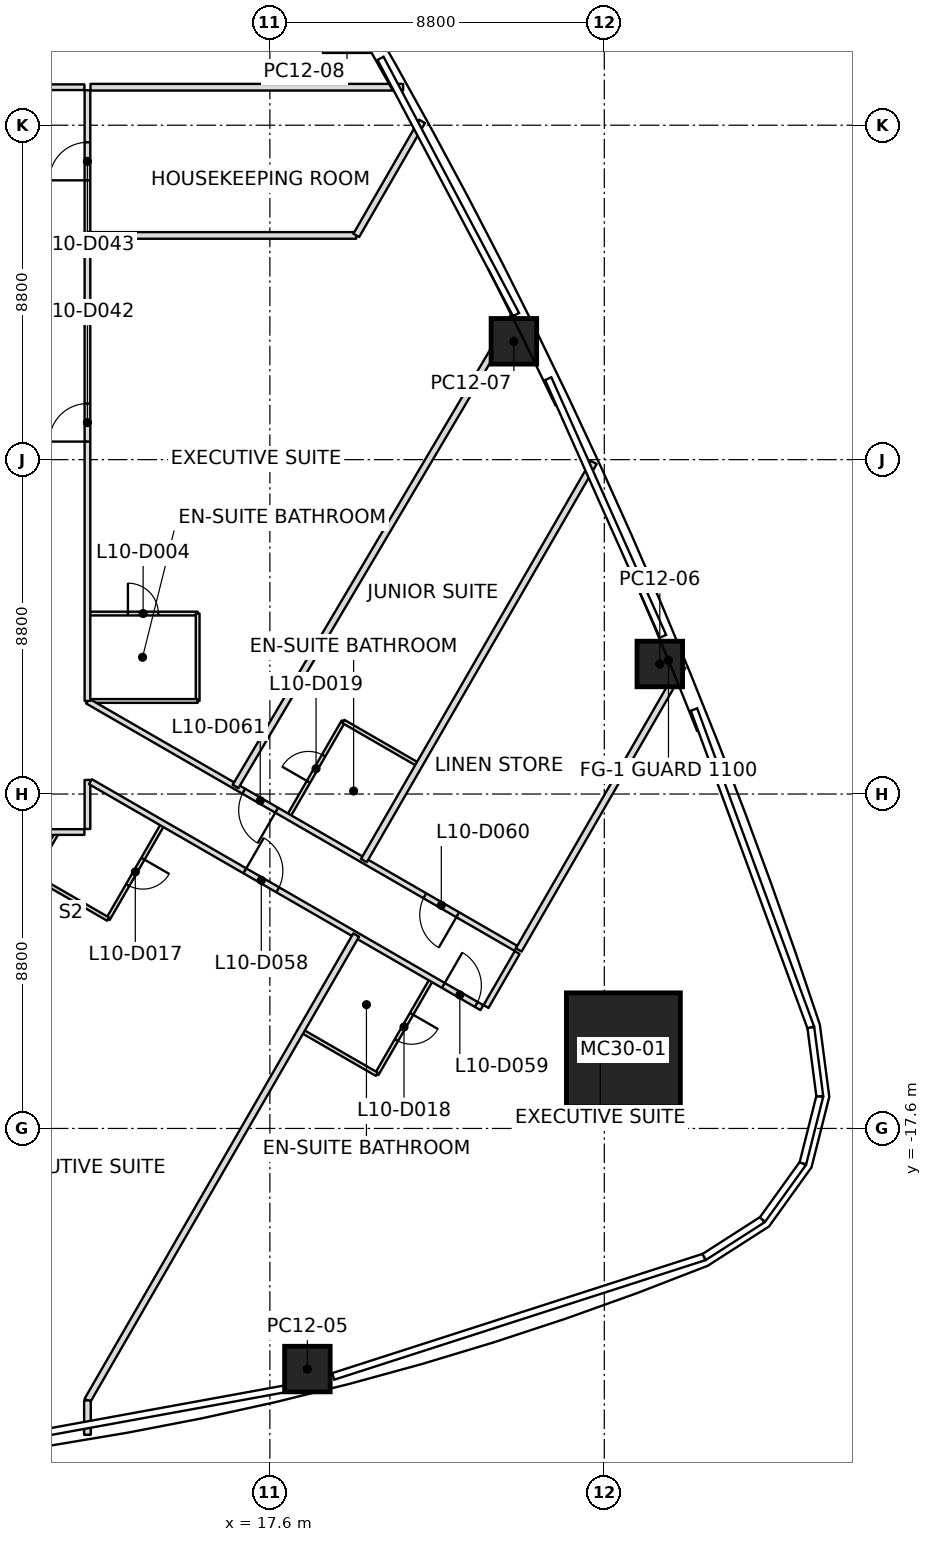
"""IFC4 building model, lengths in metres.
Left out: names, types, materials, properties, quantities, classifications, styles, units other than length and angle.
Written with IfcOpenShell. Run it as: python <this file> out.ifc"""

import sys

from ifc_helpers import new_model, si_unit, direction, frame, frame_2d, origin, origin_2d, place, context, subcontext, project, spatial, rectangle, extrude, clip, halfspace, element, fill, save


model = new_model("IFC4")
c1 = context("Model", 3, precision=1e-05, world=origin(), true_north=direction((0.0, 1.0)))
c2 = subcontext(c1, "Body", "Model", "MODEL_VIEW")
j1 = project(units=[si_unit("LENGTHUNIT", "METRE"), si_unit("PLANEANGLEUNIT", "RADIAN")], contexts=[c1])
p1 = place(None, origin())
s1 = spatial("IfcSite", under=j1, at=p1, CompositionType="ELEMENT")
p2 = place(p1, origin())
s2 = spatial("IfcBuilding", under=s1, at=p2, CompositionType="ELEMENT")
p3 = place(p2, frame((0.0, 0.0, 59.1)))
s3 = spatial("IfcBuildingStorey", under=s2, at=p3, CompositionType="ELEMENT", Elevation=59.1)
p4 = place(p3, frame((26.902, -15.532, 0.0), z_axis=(-0.030597838594, 0.017672889533, 0.99937552564), x_axis=(0.99953177652, 0.000541005533, 0.030593055416)))
e1 = element("IfcColumn", 1, at=p4, inside=s3, PredefinedType="COLUMN", context=c2, shape_type="SweptSolid", body=[
    extrude(rectangle(XDim=3.0, YDim=3.0, at=origin_2d()), origin(), (0.0, 0.0, 1.0), 3.702),
])
p5 = place(p3, frame((18.587, -23.932, 0.0), z_axis=(-0.018967622747, 0.174735976675, 0.984432612088), x_axis=(0.970613488438, 0.239463695606, -0.023803246622)))
e2 = element("IfcColumn", 2, at=p5, inside=s3, PredefinedType="COLUMN", context=c2, shape_type="SweptSolid", body=[
    clip(clip(extrude(rectangle(XDim=1.2, YDim=1.2, at=origin_2d()), origin(), (0.0, 0.0, 1.0), 3.759), halfspace(frame((0.0, 0.0, 0.001)), True)), halfspace(frame((0.0, 0.0, 3.758)), False)),
])
p6 = place(p3, frame((27.861, -5.378, 0.0), z_axis=(-0.019526598325, 0.011016695677, 0.999748640596), x_axis=(-0.381644572431, 0.92414086278, -0.017637632301)))
e3 = element("IfcColumn", 3, at=p6, inside=s3, PredefinedType="COLUMN", context=c2, shape_type="SweptSolid", body=[
    extrude(rectangle(XDim=1.2, YDim=1.2, at=origin_2d()), origin(), (0.0, 0.0, 1.0), 3.701),
])
p7 = place(p3, frame((24.021, 3.114, 0.0), z_axis=(-0.015240683228, 0.002309194428, 0.99988118754), x_axis=(-0.441769278209, 0.897085485762, -0.008805456633)))
e4 = element("IfcColumn", 4, at=p7, inside=s3, PredefinedType="COLUMN", context=c2, shape_type="SweptSolid", body=[
    extrude(rectangle(XDim=1.2, YDim=1.2, at=origin_2d()), origin(), (0.0, 0.0, 1.0), 3.7),
])
p8 = place(p3, frame((19.63, 11.333, 0.0), z_axis=(-0.010688729499, -0.00613612249, 0.999924046647), x_axis=(-0.49997143695, 0.866041893524, -2.9922579e-05)))
e5 = element("IfcColumn", 5, at=p8, inside=s3, PredefinedType="COLUMN", context=c2, shape_type="SweptSolid", body=[
    extrude(rectangle(XDim=1.2, YDim=1.2, at=origin_2d()), origin(), (0.0, 0.0, 1.0), 3.7),
])
p9 = place(p3, frame((19.87, -12.511, 0.0), z_axis=(0.0, 0.0, 1.0), x_axis=(-0.500001430823, -0.866024577697, 0.0)))
e6 = element("IfcWall", 6, at=p9, inside=s3, PredefinedType="PARTITIONING", context=c2, shape_type="SweptSolid", body=[
    extrude(rectangle(XDim=14.141, YDim=0.175, at=frame_2d((7.07, 0.0))), origin(), (0.0, 0.0, 1.0), 2.797),
])
p10 = place(p3, frame((12.8, -24.758, 0.0), z_axis=(0.0, 0.0, 1.0), x_axis=(0.0, -1.0, 0.0)))
e7 = element("IfcWall", 7, at=p10, inside=s3, PredefinedType="PARTITIONING", context=c2, shape_type="SweptSolid", body=[
    extrude(rectangle(XDim=0.904, YDim=0.175, at=frame_2d((0.452, 0.0))), origin(), (0.0, 0.0, 1.0), 3.15),
])
p11 = place(p3, frame((12.8, 5.9, 0.0), z_axis=(0.0, 0.0, 1.0), x_axis=(1.0, 0.0, 0.0)))
e8 = element("IfcWall", 8, at=p11, inside=s3, PredefinedType="PARTITIONING", context=c2, shape_type="SweptSolid", body=[
    extrude(rectangle(XDim=7.073, YDim=0.175, at=frame_2d((3.537, 0.0))), origin(), (0.0, 0.0, 1.0), 3.093),
])
p12 = place(p3, frame((19.873, 5.9, 0.0), z_axis=(0.0, 0.0, 1.0), x_axis=(0.499988788333, 0.866031876747, 0.0)))
e9 = element("IfcWall", 9, at=p12, inside=s3, PredefinedType="PARTITIONING", context=c2, shape_type="SweptSolid", body=[
    extrude(rectangle(XDim=3.465, YDim=0.175, at=frame_2d((1.732, 0.0))), origin(), (0.0, 0.0, 1.0), 2.934),
])
p13 = place(p3, frame((12.88, 9.8, 0.0), z_axis=(0.0, 0.0, 1.0), x_axis=(1.0, 0.0, 0.0)))
e10 = element("IfcWall", 10, at=p13, inside=s3, PredefinedType="PARTITIONING", context=c2, shape_type="SweptSolid", body=[
    extrude(rectangle(XDim=8.227, YDim=0.175, at=frame_2d((4.114, 0.0))), origin(), (0.0, 0.0, 1.0), 2.934),
])
p14 = place(p3, frame((24.011, 3.761, 0.0), z_axis=(0.0, 0.0, 1.0), x_axis=(-0.509232005263, -0.860629284196, 0.0)))
e11 = element("IfcWall", 11, at=p14, inside=s3, PredefinedType="PARTITIONING", context=c2, shape_type="SweptSolid", body=[
    extrude(rectangle(XDim=14.364, YDim=0.175, at=frame_2d((7.182, 0.0))), origin(), (0.0, 0.0, 1.0), 2.947),
])
p15 = place(p3, frame((26.124, -0.073, 0.0), z_axis=(0.0, 0.0, 1.0), x_axis=(-0.49999146167, -0.866030333335, 0.0)))
e12 = element("IfcWall", 12, at=p15, inside=s3, PredefinedType="PARTITIONING", context=c2, shape_type="SweptSolid", body=[
    extrude(rectangle(XDim=12.098, YDim=0.175, at=frame_2d((6.049, 0.0))), origin(), (0.0, 0.0, 1.0), 2.934),
])
p16 = place(p3, frame((24.148, -12.903, 0.0), z_axis=(0.0, 0.0, 1.0), x_axis=(0.500014238528, 0.866017183011, 0.0)))
e13 = element("IfcWall", 13, at=p16, inside=s3, PredefinedType="PARTITIONING", context=c2, shape_type="SweptSolid", body=[
    extrude(rectangle(XDim=8.619, YDim=0.175, at=frame_2d((4.31, 0.0))), origin(), (0.0, 0.0, 1.0), 2.934),
])
p17 = place(p3, frame((-12.72, -9.8, 0.0), z_axis=(0.0, 0.0, 1.0), x_axis=(1.0, 0.0, 0.0)))
e14 = element("IfcWall", 14, at=p17, inside=s3, PredefinedType="PARTITIONING", context=c2, shape_type="SweptSolid", body=[
    extrude(rectangle(XDim=25.44, YDim=0.15, at=frame_2d((12.72, 0.0))), origin(), (0.0, 0.0, 1.0), 2.947),
])
p18 = place(p17, frame((3.07, 0.0, 0.0)))
e15 = element("IfcOpeningElement", 15, at=p18, cuts=e14, PredefinedType="OPENING", context=c2, shape_type="SweptSolid", body=[
    extrude(rectangle(XDim=1.0, YDim=2.1, at=frame_2d((0.5, 1.05))), frame((0.0, 0.075, 0.0), z_axis=(0.0, -1.0, 0.0), x_axis=(1.0, 0.0, 0.0)), (0.0, 0.0, 1.0), 0.15),
])
p19 = place(p17, frame((7.47, 0.0, 0.0)))
e16 = element("IfcOpeningElement", 16, at=p19, cuts=e14, PredefinedType="OPENING", context=c2, shape_type="SweptSolid", body=[
    extrude(rectangle(XDim=1.0, YDim=2.1, at=frame_2d((0.5, 1.05))), frame((0.0, 0.075, 0.0), z_axis=(0.0, -1.0, 0.0), x_axis=(1.0, 0.0, 0.0)), (0.0, 0.0, 1.0), 0.15),
])
p20 = place(p17, frame((11.67, 0.0, 0.0)))
e17 = element("IfcOpeningElement", 17, at=p20, cuts=e14, PredefinedType="OPENING", context=c2, shape_type="SweptSolid", body=[
    extrude(rectangle(XDim=1.0, YDim=2.1, at=frame_2d((0.5, 1.05))), frame((0.0, 0.075, 0.0), z_axis=(0.0, -1.0, 0.0), x_axis=(1.0, 0.0, 0.0)), (0.0, 0.0, 1.0), 0.15),
])
p21 = place(p17, frame((15.87, 0.0, 0.0)))
e18 = element("IfcOpeningElement", 18, at=p21, cuts=e14, PredefinedType="OPENING", context=c2, shape_type="SweptSolid", body=[
    extrude(rectangle(XDim=1.0, YDim=2.1, at=frame_2d((0.5, 1.05))), frame((0.0, 0.075, 0.0), z_axis=(0.0, -1.0, 0.0), x_axis=(1.0, 0.0, 0.0)), (0.0, 0.0, 1.0), 0.15),
])
p22 = place(p17, frame((20.07, 0.0, 0.0)))
e19 = element("IfcOpeningElement", 19, at=p22, cuts=e14, PredefinedType="OPENING", context=c2, shape_type="SweptSolid", body=[
    extrude(rectangle(XDim=1.0, YDim=2.1, at=frame_2d((0.5, 1.05))), frame((0.0, 0.075, 0.0), z_axis=(0.0, -1.0, 0.0), x_axis=(1.0, 0.0, 0.0)), (0.0, 0.0, 1.0), 0.15),
])
p23 = place(p3, frame((12.72, 9.8, 0.0), z_axis=(0.0, 0.0, 1.0), x_axis=(-1.0, 0.0, 0.0)))
e20 = element("IfcWall", 20, at=p23, inside=s3, PredefinedType="PARTITIONING", context=c2, shape_type="SweptSolid", body=[
    extrude(rectangle(XDim=3.42, YDim=0.15, at=frame_2d((1.71, 0.0))), origin(), (0.0, 0.0, 1.0), 3.093),
])
p24 = place(p23, frame((1.16, 0.0, 0.0)))
e21 = element("IfcOpeningElement", 21, at=p24, cuts=e20, PredefinedType="OPENING", context=c2, shape_type="SweptSolid", body=[
    extrude(rectangle(XDim=1.0, YDim=2.1, at=frame_2d((0.5, 1.05))), frame((0.0, 0.075, 0.0), z_axis=(0.0, -1.0, 0.0), x_axis=(1.0, 0.0, 0.0)), (0.0, 0.0, 1.0), 0.15),
])
p25 = place(p3, frame((12.8, -9.72, 0.0), z_axis=(0.0, 0.0, 1.0), x_axis=(0.0, 1.0, 0.0)))
e22 = element("IfcWall", 22, at=p25, inside=s3, PredefinedType="PARTITIONING", context=c2, shape_type="SweptSolid", body=[
    extrude(rectangle(XDim=1.291, YDim=0.15, at=frame_2d((0.646, 0.0))), origin(), (0.0, 0.0, 1.0), 2.797),
])
p26 = place(p3, frame((12.879, -8.475, 0.0), z_axis=(0.0, 0.0, 1.0), x_axis=(0.866021146684, -0.500007373442, 0.0)))
e23 = element("IfcWall", 23, at=p26, inside=s3, PredefinedType="PARTITIONING", context=c2, shape_type="SweptSolid", body=[
    extrude(rectangle(XDim=11.892, YDim=0.15, at=frame_2d((5.946, 0.0))), origin(), (0.0, 0.0, 1.0), 2.797),
])
p27 = place(p26, frame((4.69, 0.0, 0.0)))
e24 = element("IfcOpeningElement", 24, at=p27, cuts=e23, PredefinedType="OPENING", context=c2, shape_type="SweptSolid", body=[
    extrude(rectangle(XDim=1.0, YDim=2.1, at=frame_2d((0.5, 1.05))), frame((0.0, 0.075, 0.0), z_axis=(0.0, -1.0, 0.0), x_axis=(1.0, 0.0, 0.0)), (0.0, 0.0, 1.0), 0.15),
])
p28 = place(p26, frame((10.723, 0.0, 0.0)))
e25 = element("IfcOpeningElement", 25, at=p28, cuts=e23, PredefinedType="OPENING", context=c2, shape_type="SweptSolid", body=[
    extrude(rectangle(XDim=1.0, YDim=2.1, at=frame_2d((0.5, 1.05))), frame((0.0, 0.075, 0.0), z_axis=(0.0, -1.0, 0.0), x_axis=(1.0, 0.0, 0.0)), (0.0, 0.0, 1.0), 0.15),
])
p29 = place(p3, frame((24.079, -12.863, 0.0), z_axis=(0.0, 0.0, 1.0), x_axis=(-0.866024189303, 0.500002103537, 0.0)))
e26 = element("IfcWall", 26, at=p29, inside=s3, PredefinedType="PARTITIONING", context=c2, shape_type="SweptSolid", body=[
    extrude(rectangle(XDim=13.023, YDim=0.15, at=frame_2d((6.512, 0.0))), origin(), (0.0, 0.0, 1.0), 2.947),
])
p30 = place(p29, frame((1.771, 0.0, 0.0)))
e27 = element("IfcOpeningElement", 27, at=p30, cuts=e26, PredefinedType="OPENING", context=c2, shape_type="SweptSolid", body=[
    extrude(rectangle(XDim=1.0, YDim=2.1, at=frame_2d((0.5, 1.05))), frame((0.0, 0.075, 0.0), z_axis=(0.0, -1.0, 0.0), x_axis=(1.0, 0.0, 0.0)), (0.0, 0.0, 1.0), 0.15),
])
p31 = place(p29, frame((7.273, 0.0, 0.0)))
e28 = element("IfcOpeningElement", 28, at=p31, cuts=e26, PredefinedType="OPENING", context=c2, shape_type="SweptSolid", body=[
    extrude(rectangle(XDim=1.0, YDim=2.1, at=frame_2d((0.5, 1.05))), frame((0.0, 0.075, 0.0), z_axis=(0.0, -1.0, 0.0), x_axis=(1.0, 0.0, 0.0)), (0.0, 0.0, 1.0), 0.15),
])
p32 = place(p3, frame((12.8, -6.351, 0.0), z_axis=(0.0, 0.0, 1.0), x_axis=(0.0, 1.0, 0.0)))
e29 = element("IfcWall", 29, at=p32, inside=s3, PredefinedType="PARTITIONING", context=c2, shape_type="SweptSolid", body=[
    extrude(rectangle(XDim=16.071, YDim=0.15, at=frame_2d((8.035, 0.0))), origin(), (0.0, 0.0, 1.0), 3.017),
])
p33 = place(p32, frame((6.825, 0.0, 0.0)))
e30 = element("IfcOpeningElement", 30, at=p33, cuts=e29, PredefinedType="OPENING", context=c2, shape_type="SweptSolid", body=[
    extrude(rectangle(XDim=1.0, YDim=2.1, at=frame_2d((0.5, 1.05))), frame((0.0, 0.075, 0.0), z_axis=(0.0, -1.0, 0.0), x_axis=(1.0, 0.0, 0.0)), (0.0, 0.0, 1.0), 0.15),
])
p34 = place(p32, frame((13.701, 0.0, 0.0)))
e31 = element("IfcOpeningElement", 31, at=p34, cuts=e29, PredefinedType="OPENING", context=c2, shape_type="SweptSolid", body=[
    extrude(rectangle(XDim=1.0, YDim=2.1, at=frame_2d((0.5, 1.05))), frame((0.0, 0.075, 0.0), z_axis=(0.0, -1.0, 0.0), x_axis=(1.0, 0.0, 0.0)), (0.0, 0.0, 1.0), 0.15),
])
p35 = place(p3, frame((23.288, -14.392, 0.0), z_axis=(0.0, 0.0, 1.0), x_axis=(0.499997335587, 0.866026942079, 0.0)))
e32 = element("IfcWall", 32, at=p35, inside=s3, PredefinedType="PARTITIONING", context=c2, shape_type="SweptSolid", body=[
    extrude(rectangle(XDim=1.64, YDim=0.15, at=frame_2d((0.82, 0.0))), origin(), (0.0, 0.0, 1.0), 2.797),
])
p36 = place(p3, frame((14.777, -9.605, 0.0), z_axis=(0.0, 0.0, 1.0), x_axis=(-0.499999802827, -0.866025517622, 0.0)))
e33 = element("IfcWall", 33, at=p36, inside=s3, PredefinedType="PARTITIONING", context=c2, shape_type="SweptSolid", body=[
    extrude(rectangle(XDim=2.87, YDim=0.1, at=frame_2d((1.435, 0.0))), origin(), (0.0, 0.0, 1.0), 2.797),
])
p37 = place(p36, frame((1.035, 0.0, 0.0)))
e34 = element("IfcOpeningElement", 34, at=p37, cuts=e33, PredefinedType="OPENING", context=c2, shape_type="SweptSolid", body=[
    extrude(rectangle(XDim=0.8, YDim=2.1, at=frame_2d((0.4, 1.05))), frame((0.0, 0.05, 0.0), z_axis=(0.0, -1.0, 0.0), x_axis=(1.0, 0.0, 0.0)), (0.0, 0.0, 1.0), 0.1),
])
p38 = place(p3, frame((13.342, -12.091, 0.0), z_axis=(0.0, 0.0, 1.0), x_axis=(-0.86602648383, 0.499998129301, 0.0)))
e35 = element("IfcWall", 35, at=p38, inside=s3, PredefinedType="PARTITIONING", context=c2, shape_type="SweptSolid", body=[
    extrude(rectangle(XDim=2.3, YDim=0.1, at=frame_2d((1.15, 0.0))), origin(), (0.0, 0.0, 1.0), 2.947),
])
p39 = place(p3, frame((11.35, -10.941, 0.0), z_axis=(0.0, 0.0, 1.0), x_axis=(0.499865263774, 0.866103179807, 0.0)))
e36 = element("IfcWall", 36, at=p39, inside=s3, PredefinedType="PARTITIONING", context=c2, shape_type="SweptSolid", body=[
    extrude(rectangle(XDim=1.282, YDim=0.1, at=frame_2d((0.641, 0.0))), origin(), (0.0, 0.0, 1.0), 3.15),
])
p40 = place(p3, frame((12.83, -4.051, 0.0), z_axis=(0.0, 0.0, 1.0), x_axis=(1.0, 0.0, 0.0)))
e37 = element("IfcWall", 37, at=p40, inside=s3, PredefinedType="PARTITIONING", context=c2, shape_type="SweptSolid", body=[
    extrude(rectangle(XDim=2.87, YDim=0.1, at=frame_2d((1.435, 0.0))), origin(), (0.0, 0.0, 1.0), 3.15),
])
p41 = place(p40, frame((1.035, 0.0, 0.0)))
e38 = element("IfcOpeningElement", 38, at=p41, cuts=e37, PredefinedType="OPENING", context=c2, shape_type="SweptSolid", body=[
    extrude(rectangle(XDim=0.8, YDim=2.1, at=frame_2d((0.4, 1.05))), frame((0.0, 0.05, 0.0), z_axis=(0.0, -1.0, 0.0), x_axis=(1.0, 0.0, 0.0)), (0.0, 0.0, 1.0), 0.1),
])
p42 = place(p3, frame((15.7, -4.051, 0.0), z_axis=(0.0, 0.0, 1.0), x_axis=(0.0, -1.0, 0.0)))
e39 = element("IfcWall", 39, at=p42, inside=s3, PredefinedType="PARTITIONING", context=c2, shape_type="SweptSolid", body=[
    extrude(rectangle(XDim=2.3, YDim=0.1, at=frame_2d((1.15, 0.0))), origin(), (0.0, 0.0, 1.0), 2.947),
])
p43 = place(p3, frame((15.7, -6.351, 0.0), z_axis=(0.0, 0.0, 1.0), x_axis=(-1.0, 0.0, 0.0)))
e40 = element("IfcWall", 40, at=p43, inside=s3, PredefinedType="PARTITIONING", context=c2, shape_type="SweptSolid", body=[
    extrude(rectangle(XDim=2.84, YDim=0.1, at=frame_2d((1.42, 0.0))), origin(), (0.0, 0.0, 1.0), 2.947),
])
p44 = place(p3, frame((18.098, -9.375, 0.0), z_axis=(0.0, 0.0, 1.0), x_axis=(0.499936001555, 0.866062350151, 0.0)))
e41 = element("IfcWall", 41, at=p44, inside=s3, PredefinedType="PARTITIONING", context=c2, shape_type="SweptSolid", body=[
    extrude(rectangle(XDim=2.87, YDim=0.1, at=frame_2d((1.435, 0.0))), origin(), (0.0, 0.0, 1.0), 2.947),
])
p45 = place(p44, frame((1.035, 0.0, 0.0)))
e42 = element("IfcOpeningElement", 42, at=p45, cuts=e41, PredefinedType="OPENING", context=c2, shape_type="SweptSolid", body=[
    extrude(rectangle(XDim=0.8, YDim=2.1, at=frame_2d((0.4, 1.05))), frame((0.0, 0.05, 0.0), z_axis=(0.0, -1.0, 0.0), x_axis=(1.0, 0.0, 0.0)), (0.0, 0.0, 1.0), 0.1),
])
p46 = place(p3, frame((19.533, -6.889, 0.0), z_axis=(0.0, 0.0, 1.0), x_axis=(0.866017224141, -0.500014167291, 0.0)))
e43 = element("IfcWall", 43, at=p46, inside=s3, PredefinedType="PARTITIONING", context=c2, shape_type="SweptSolid", body=[
    extrude(rectangle(XDim=2.27, YDim=0.1, at=frame_2d((1.135, 0.0))), origin(), (0.0, 0.0, 1.0), 2.947),
])
p47 = place(p3, frame((21.847, -13.687, 0.0), z_axis=(0.0, 0.0, 1.0), x_axis=(-0.499999802827, -0.866025517622, 0.0)))
e44 = element("IfcWall", 44, at=p47, inside=s3, PredefinedType="PARTITIONING", context=c2, shape_type="SweptSolid", body=[
    extrude(rectangle(XDim=2.87, YDim=0.1, at=frame_2d((1.435, 0.0))), origin(), (0.0, 0.0, 1.0), 3.15),
])
p48 = place(p47, frame((1.035, 0.0, 0.0)))
e45 = element("IfcOpeningElement", 45, at=p48, cuts=e44, PredefinedType="OPENING", context=c2, shape_type="SweptSolid", body=[
    extrude(rectangle(XDim=0.8, YDim=2.1, at=frame_2d((0.4, 1.05))), frame((0.0, 0.05, 0.0), z_axis=(0.0, -1.0, 0.0), x_axis=(1.0, 0.0, 0.0)), (0.0, 0.0, 1.0), 0.1),
])
p49 = place(p3, frame((20.412, -16.173, 0.0), z_axis=(0.0, 0.0, 1.0), x_axis=(-0.866017224141, 0.500014167291, 0.0)))
e46 = element("IfcWall", 46, at=p49, inside=s3, PredefinedType="PARTITIONING", context=c2, shape_type="SweptSolid", body=[
    extrude(rectangle(XDim=2.27, YDim=0.1, at=frame_2d((1.135, 0.0))), origin(), (0.0, 0.0, 1.0), 3.15),
])
p50 = place(p33, origin())
e47 = element("IfcDoor", 47, at=p50, inside=s3, OperationType="SINGLE_SWING_RIGHT", PredefinedType="DOOR", context=c2, shape_type="SweptSolid", body=[
    extrude(rectangle(XDim=1.0, YDim=2.1, at=frame_2d((0.5, 1.05))), frame((0.0, 0.025, 0.0), z_axis=(0.0, -1.0, 0.0), x_axis=(1.0, 0.0, 0.0)), (0.0, 0.0, 1.0), 0.05),
])
fill(e30, e47)
p51 = place(p41, origin())
e48 = element("IfcDoor", 48, at=p51, inside=s3, OperationType="SINGLE_SWING_LEFT", PredefinedType="DOOR", context=c2, shape_type="SweptSolid", body=[
    extrude(rectangle(XDim=0.8, YDim=2.1, at=frame_2d((0.4, 1.05))), frame((0.0, 0.025, 0.0), z_axis=(0.0, -1.0, 0.0), x_axis=(1.0, 0.0, 0.0)), (0.0, 0.0, 1.0), 0.05),
])
fill(e38, e48)
p52 = place(p34, origin())
e49 = element("IfcDoor", 49, at=p52, inside=s3, OperationType="SINGLE_SWING_LEFT", PredefinedType="DOOR", context=c2, shape_type="SweptSolid", body=[
    extrude(rectangle(XDim=1.0, YDim=2.1, at=frame_2d((0.5, 1.05))), frame((0.0, 0.025, 0.0), z_axis=(0.0, -1.0, 0.0), x_axis=(1.0, 0.0, 0.0)), (0.0, 0.0, 1.0), 0.05),
])
fill(e31, e49)
p53 = place(p27, origin())
e50 = element("IfcDoor", 50, at=p53, inside=s3, OperationType="SINGLE_SWING_LEFT", PredefinedType="DOOR", context=c2, shape_type="SweptSolid", body=[
    extrude(rectangle(XDim=1.0, YDim=2.1, at=frame_2d((0.5, 1.05))), frame((0.0, 0.025, 0.0), z_axis=(0.0, -1.0, 0.0), x_axis=(1.0, 0.0, 0.0)), (0.0, 0.0, 1.0), 0.05),
])
fill(e24, e50)
p54 = place(p37, origin())
e51 = element("IfcDoor", 51, at=p54, inside=s3, OperationType="SINGLE_SWING_LEFT", PredefinedType="DOOR", context=c2, shape_type="SweptSolid", body=[
    extrude(rectangle(XDim=0.8, YDim=2.1, at=frame_2d((0.4, 1.05))), frame((0.0, 0.025, 0.0), z_axis=(0.0, -1.0, 0.0), x_axis=(1.0, 0.0, 0.0)), (0.0, 0.0, 1.0), 0.05),
])
fill(e34, e51)
p55 = place(p28, origin())
e52 = element("IfcDoor", 52, at=p55, inside=s3, OperationType="SINGLE_SWING_LEFT", PredefinedType="DOOR", context=c2, shape_type="SweptSolid", body=[
    extrude(rectangle(XDim=1.0, YDim=2.1, at=frame_2d((0.5, 1.05))), frame((0.0, 0.025, 0.0), z_axis=(0.0, -1.0, 0.0), x_axis=(1.0, 0.0, 0.0)), (0.0, 0.0, 1.0), 0.05),
])
fill(e25, e52)
p56 = place(p48, origin())
e53 = element("IfcDoor", 53, at=p56, inside=s3, OperationType="SINGLE_SWING_LEFT", PredefinedType="DOOR", context=c2, shape_type="SweptSolid", body=[
    extrude(rectangle(XDim=0.8, YDim=2.1, at=frame_2d((0.4, 1.05))), frame((0.0, 0.025, 0.0), z_axis=(0.0, -1.0, 0.0), x_axis=(1.0, 0.0, 0.0)), (0.0, 0.0, 1.0), 0.05),
])
fill(e45, e53)
p57 = place(p30, origin())
e54 = element("IfcDoor", 54, at=p57, inside=s3, OperationType="SINGLE_SWING_RIGHT", PredefinedType="DOOR", context=c2, shape_type="SweptSolid", body=[
    extrude(rectangle(XDim=1.0, YDim=2.1, at=frame_2d((0.5, 1.05))), frame((0.0, 0.025, 0.0), z_axis=(0.0, -1.0, 0.0), x_axis=(1.0, 0.0, 0.0)), (0.0, 0.0, 1.0), 0.05),
])
fill(e27, e54)
p58 = place(p31, origin())
e55 = element("IfcDoor", 55, at=p58, inside=s3, OperationType="SINGLE_SWING_LEFT", PredefinedType="DOOR", context=c2, shape_type="SweptSolid", body=[
    extrude(rectangle(XDim=1.0, YDim=2.1, at=frame_2d((0.5, 1.05))), frame((0.0, 0.025, 0.0), z_axis=(0.0, -1.0, 0.0), x_axis=(1.0, 0.0, 0.0)), (0.0, 0.0, 1.0), 0.05),
])
fill(e28, e55)
p59 = place(p45, origin())
e56 = element("IfcDoor", 56, at=p59, inside=s3, OperationType="SINGLE_SWING_RIGHT", PredefinedType="DOOR", context=c2, shape_type="SweptSolid", body=[
    extrude(rectangle(XDim=0.8, YDim=2.1, at=frame_2d((0.4, 1.05))), frame((0.0, 0.025, 0.0), z_axis=(0.0, -1.0, 0.0), x_axis=(1.0, 0.0, 0.0)), (0.0, 0.0, 1.0), 0.05),
])
fill(e42, e56)
save(model, sys.argv[1])
